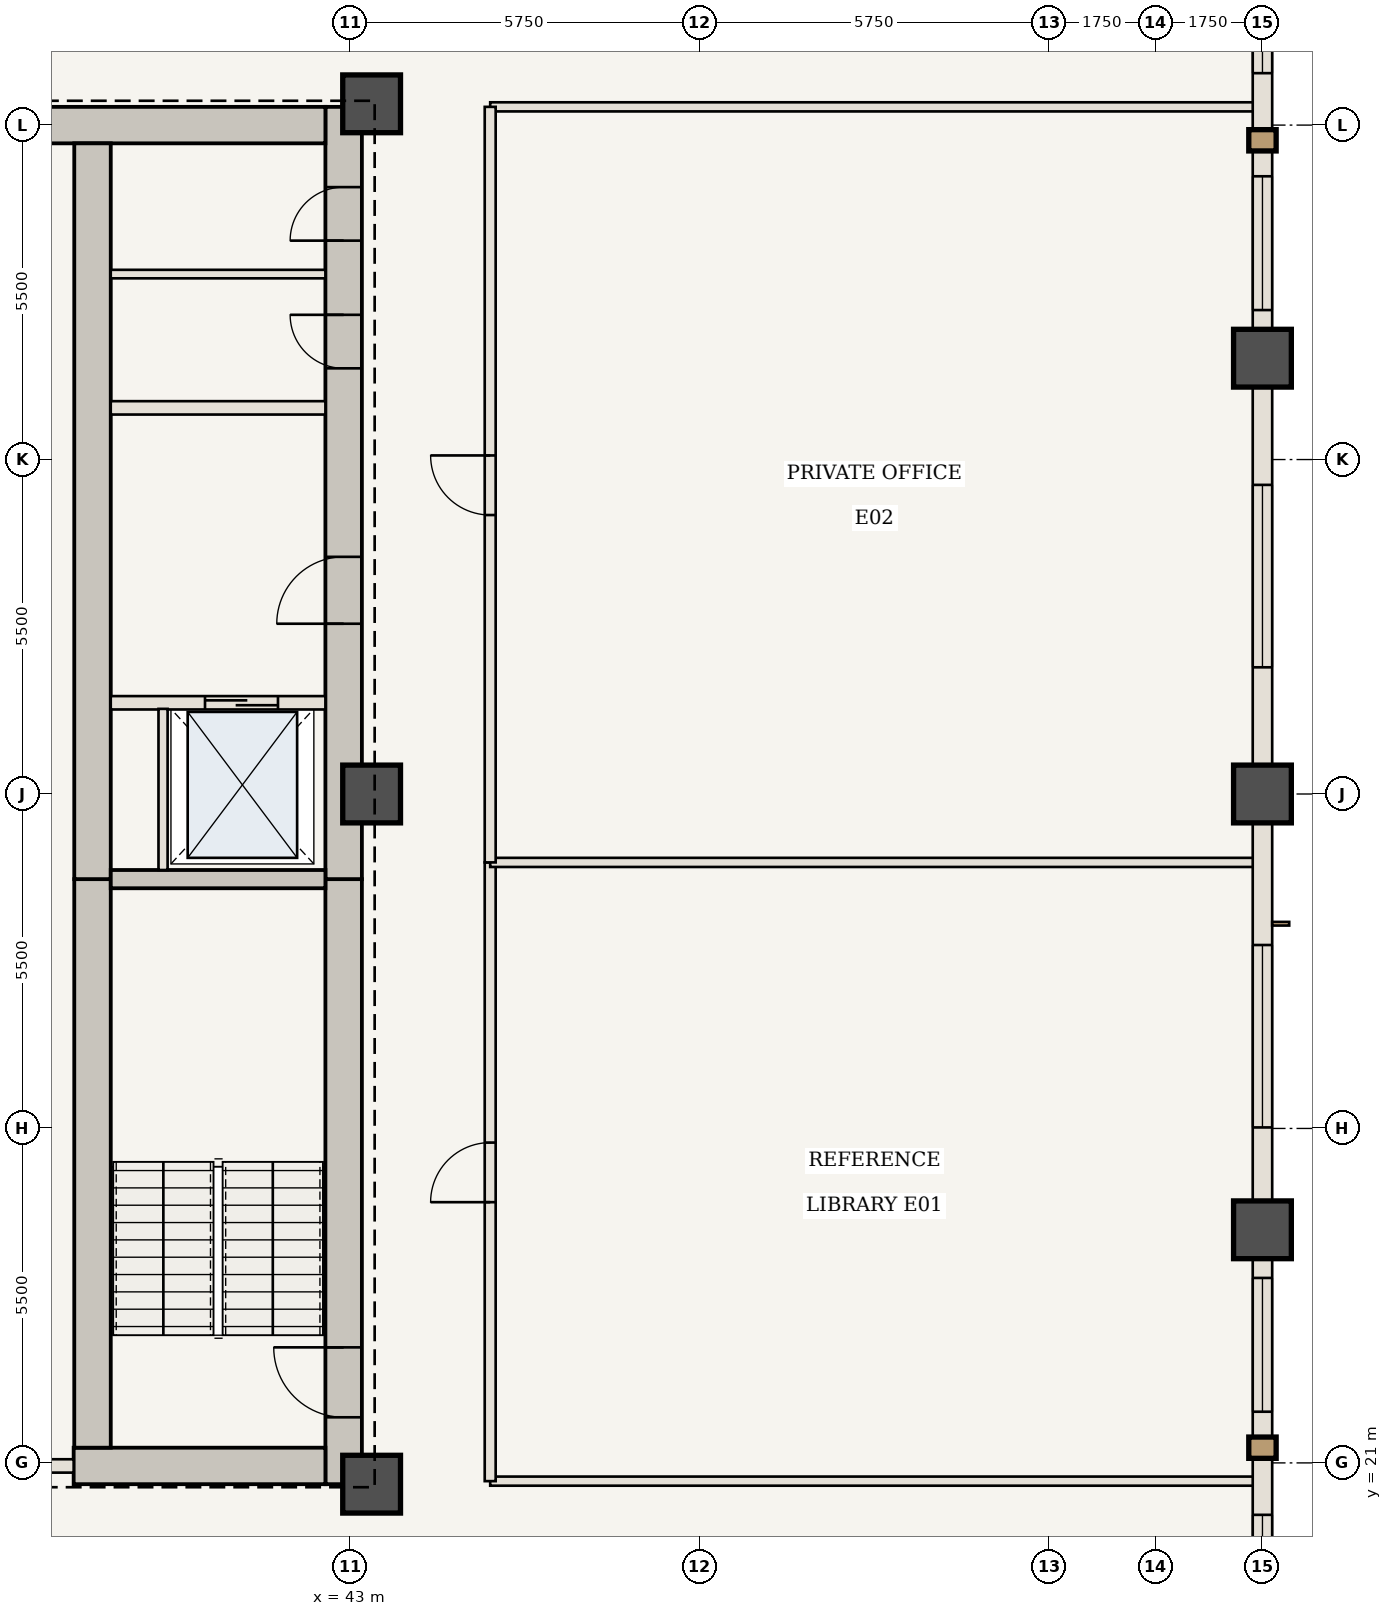
"""IFC4 building model, lengths in metres.
Left out: names, types, materials, properties, quantities, classifications, styles, units other than length and angle.
Written with IfcOpenShell. Run it as: python <this file> out.ifc"""

import sys

from ifc_helpers import new_model, si_unit, direction, frame, frame_2d, origin, origin_2d, place, context, subcontext, project, spatial, rectangle, extrude, element, fill, save


model = new_model("IFC4")
c1 = context("Model", 3, precision=1e-05, world=origin(), true_north=direction((0.0, 1.0)))
c2 = subcontext(c1, "Body", "Model", "MODEL_VIEW")
j1 = project(units=[si_unit("LENGTHUNIT", "METRE"), si_unit("PLANEANGLEUNIT", "RADIAN")], contexts=[c1])
p1 = place(None, origin())
s1 = spatial("IfcSite", under=j1, at=p1, CompositionType="ELEMENT")
p2 = place(p1, origin())
s2 = spatial("IfcBuilding", under=s1, at=p2, CompositionType="ELEMENT")
p3 = place(p2, frame((0.0, 0.0, 133.7)))
s3 = spatial("IfcBuildingStorey", under=s2, at=p3, CompositionType="ELEMENT", Elevation=133.7)
p4 = place(p3, frame((42.89, 20.65, 0.0), z_axis=(0.0, 0.0, 1.0), x_axis=(0.0, 1.0, 0.0)))
e1 = element("IfcWall", 1, at=p4, inside=s3, PredefinedType="SHEAR", context=c2, shape_type="SweptSolid", body=[
    extrude(rectangle(XDim=9.95, YDim=0.6, at=frame_2d((4.975, 0.0))), origin(), (0.0, 0.0, 1.0), 3.85),
])
p5 = place(p4, frame((1.1, 0.0, 0.0)))
e2 = element("IfcOpeningElement", 2, at=p5, cuts=e1, PredefinedType="OPENING", context=c2, shape_type="SweptSolid", body=[
    extrude(rectangle(XDim=1.15, YDim=2.15, at=frame_2d((0.575, 1.075))), frame((0.0, 0.31, 0.0), z_axis=(0.0, -1.0, 0.0), x_axis=(1.0, 0.0, 0.0)), (0.0, 0.0, 1.0), 0.62),
])
p6 = place(p3, frame((42.89, 30.6, 0.0), z_axis=(0.0, 0.0, 1.0), x_axis=(0.0, 1.0, 0.0)))
e3 = element("IfcWall", 3, at=p6, inside=s3, PredefinedType="SHEAR", context=c2, shape_type="SweptSolid", body=[
    extrude(rectangle(XDim=12.7, YDim=0.6, at=frame_2d((6.35, 0.0))), origin(), (0.0, 0.0, 1.0), 3.85),
])
p7 = place(p6, frame((4.2, 0.0, 0.0)))
e4 = element("IfcOpeningElement", 4, at=p7, cuts=e3, PredefinedType="OPENING", context=c2, shape_type="SweptSolid", body=[
    extrude(rectangle(XDim=1.1, YDim=2.15, at=frame_2d((0.55, 1.075))), frame((0.0, 0.31, 0.0), z_axis=(0.0, -1.0, 0.0), x_axis=(1.0, 0.0, 0.0)), (0.0, 0.0, 1.0), 0.62),
])
p8 = place(p6, frame((8.4, 0.0, 0.0)))
e5 = element("IfcOpeningElement", 5, at=p8, cuts=e3, PredefinedType="OPENING", context=c2, shape_type="SweptSolid", body=[
    extrude(rectangle(XDim=0.88, YDim=2.1, at=frame_2d((0.44, 1.05))), frame((0.0, 0.31, 0.0), z_axis=(0.0, -1.0, 0.0), x_axis=(1.0, 0.0, 0.0)), (0.0, 0.0, 1.0), 0.62),
])
p9 = place(p6, frame((10.5, 0.0, 0.0)))
e6 = element("IfcOpeningElement", 6, at=p9, cuts=e3, PredefinedType="OPENING", context=c2, shape_type="SweptSolid", body=[
    extrude(rectangle(XDim=0.88, YDim=2.1, at=frame_2d((0.44, 1.05))), frame((0.0, 0.31, 0.0), z_axis=(0.0, -1.0, 0.0), x_axis=(1.0, 0.0, 0.0)), (0.0, 0.0, 1.0), 0.62),
])
p10 = place(p3, frame((38.45, 20.95, 0.0), z_axis=(0.0, 0.0, 1.0), x_axis=(1.0, 0.0, 0.0)))
e7 = element("IfcWall", 7, at=p10, inside=s3, PredefinedType="SHEAR", context=c2, shape_type="SweptSolid", body=[
    extrude(rectangle(XDim=4.14, YDim=0.6, at=frame_2d((2.07, 0.0))), origin(), (0.0, 0.0, 1.0), 3.85),
])
p11 = place(p3, frame((37.75, 43.0, 0.0), z_axis=(0.0, 0.0, 1.0), x_axis=(1.0, 0.0, 0.0)))
e8 = element("IfcWall", 8, at=p11, inside=s3, PredefinedType="SHEAR", context=c2, shape_type="SweptSolid", body=[
    extrude(rectangle(XDim=4.84, YDim=0.6, at=frame_2d((2.42, 0.0))), origin(), (0.0, 0.0, 1.0), 3.85),
])
p12 = place(p3, frame((38.76, 21.25, 0.0), z_axis=(0.0, 0.0, 1.0), x_axis=(0.0, 1.0, 0.0)))
e9 = element("IfcWall", 9, at=p12, inside=s3, PredefinedType="SHEAR", context=c2, shape_type="SweptSolid", body=[
    extrude(rectangle(XDim=9.35, YDim=0.6, at=frame_2d((4.675, 0.0))), origin(), (0.0, 0.0, 1.0), 3.85),
])
p13 = place(p3, frame((38.76, 30.6, 0.0), z_axis=(0.0, 0.0, 1.0), x_axis=(0.0, 1.0, 0.0)))
e10 = element("IfcWall", 10, at=p13, inside=s3, PredefinedType="SHEAR", context=c2, shape_type="SweptSolid", body=[
    extrude(rectangle(XDim=12.1, YDim=0.6, at=frame_2d((6.05, 0.0))), origin(), (0.0, 0.0, 1.0), 3.85),
])
for number, where, z_axis, x_axis in (
    (11, (43.35, 20.65, 0.0), (0.0, 0.0, 1.0), (1.0, 0.0, 0.0)),
    (12, (43.35, 32.0, 0.0), (0.0, 0.0, 1.0), (1.0, 0.0, 0.0)),
    (13, (43.35, 43.35, 0.0), (0.0, 0.0, 1.0), (1.0, 0.0, 0.0)),
    (14, (58.0, 24.833, 0.0), (0.0, 0.0, 1.0), (1.0, 0.0, 0.0)),
    (15, (58.0, 32.0, 0.0), (0.0, 0.0, 1.0), (1.0, 0.0, 0.0)),
    (16, (58.0, 39.167, 0.0), (0.0, 0.0, 1.0), (1.0, 0.0, 0.0)),
):
    element("IfcColumn", number, at=place(p3, frame(where, z_axis=z_axis, x_axis=x_axis)), inside=s3, PredefinedType="COLUMN", context=c2, shape_type="SweptSolid", body=[
        extrude(rectangle(XDim=0.95, YDim=0.95, at=origin_2d()), origin(), (0.0, 0.0, 1.0), 3.85),
    ])
p14 = place(p3, frame((39.06, 30.6, 0.0), z_axis=(0.0, 0.0, 1.0), x_axis=(1.0, 0.0, 0.0)))
e17 = element("IfcWall", 17, at=p14, inside=s3, PredefinedType="SHEAR", context=c2, shape_type="SweptSolid", body=[
    extrude(rectangle(XDim=3.53, YDim=0.3, at=frame_2d((1.765, 0.0))), origin(), (0.0, 0.0, 1.0), 3.685),
])
p15 = place(p3, frame((39.06, 33.5, 0.0), z_axis=(0.0, 0.0, 1.0), x_axis=(1.0, 0.0, 0.0)))
e18 = element("IfcWall", 18, at=p15, inside=s3, PredefinedType="STANDARD", context=c2, shape_type="SweptSolid", body=[
    extrude(rectangle(XDim=3.53, YDim=0.22, at=frame_2d((1.765, 0.0))), origin(), (0.0, 0.0, 1.0), 3.685),
])
p16 = place(p15, frame((1.55, 0.0, 0.0)))
e19 = element("IfcOpeningElement", 19, at=p16, cuts=e18, PredefinedType="OPENING", context=c2, shape_type="SweptSolid", body=[
    extrude(rectangle(XDim=1.2, YDim=2.2, at=frame_2d((0.6, 1.1))), frame((0.0, 0.12, 0.0), z_axis=(0.0, -1.0, 0.0), x_axis=(1.0, 0.0, 0.0)), (0.0, 0.0, 1.0), 0.24),
])
p17 = place(p3, frame((39.92, 30.75, 0.0), z_axis=(0.0, 0.0, 1.0), x_axis=(0.0, 1.0, 0.0)))
e20 = element("IfcWall", 20, at=p17, inside=s3, PredefinedType="STANDARD", context=c2, shape_type="SweptSolid", body=[
    extrude(rectangle(XDim=2.65, YDim=0.15, at=frame_2d((1.325, 0.0))), origin(), (0.0, 0.0, 1.0), 3.685),
])
p18 = place(p3, frame((39.06, 38.35, 0.0), z_axis=(0.0, 0.0, 1.0), x_axis=(1.0, 0.0, 0.0)))
e21 = element("IfcWall", 21, at=p18, inside=s3, PredefinedType="STANDARD", context=c2, shape_type="SweptSolid", body=[
    extrude(rectangle(XDim=3.53, YDim=0.22, at=frame_2d((1.765, 0.0))), origin(), (0.0, 0.0, 1.0), 3.685),
])
p19 = place(p3, frame((39.06, 40.55, 0.0), z_axis=(0.0, 0.0, 1.0), x_axis=(1.0, 0.0, 0.0)))
e22 = element("IfcWall", 22, at=p19, inside=s3, PredefinedType="STANDARD", context=c2, shape_type="SweptSolid", body=[
    extrude(rectangle(XDim=3.53, YDim=0.14, at=frame_2d((1.765, 0.0))), origin(), (0.0, 0.0, 1.0), 3.685),
])
p20 = place(p3, frame((35.15, 20.95, 0.0), z_axis=(0.0, 0.0, 1.0), x_axis=(1.0, 0.0, 0.0)))
e23 = element("IfcWall", 23, at=p20, inside=s3, PredefinedType="STANDARD", context=c2, shape_type="SweptSolid", body=[
    extrude(rectangle(XDim=3.3, YDim=0.22, at=frame_2d((1.65, 0.0))), origin(), (0.0, 0.0, 1.0), 3.685),
])
p21 = place(p20, frame((1.1, 0.0, 0.0)))
e24 = element("IfcOpeningElement", 24, at=p21, cuts=e23, PredefinedType="OPENING", context=c2, shape_type="SweptSolid", body=[
    extrude(rectangle(XDim=1.1, YDim=2.15, at=frame_2d((0.55, 1.075))), frame((0.0, 0.12, 0.0), z_axis=(0.0, -1.0, 0.0), x_axis=(1.0, 0.0, 0.0)), (0.0, 0.0, 1.0), 0.24),
])
for number, where, z_axis, x_axis in (
    (25, (45.3, 20.7, 0.0), (0.0, 0.0, 1.0), (1.0, 0.0, 0.0)),
    (26, (45.3, 43.3, 0.0), (0.0, 0.0, 1.0), (1.0, 0.0, 0.0)),
):
    element("IfcWall", number, at=place(p3, frame(where, z_axis=z_axis, x_axis=x_axis)), inside=s3, PredefinedType="STANDARD", context=c2, shape_type="SweptSolid", body=[
        extrude(rectangle(XDim=12.64, YDim=0.15, at=frame_2d((6.32, 0.0))), origin(), (0.0, 0.0, 1.0), 3.065),
    ])
p22 = place(p3, frame((45.3, 20.7, 0.0), z_axis=(0.0, 0.0, 1.0), x_axis=(0.0, 1.0, 0.0)))
e27 = element("IfcWall", 27, at=p22, inside=s3, PredefinedType="STANDARD", context=c2, shape_type="SweptSolid", body=[
    extrude(rectangle(XDim=10.175, YDim=0.18, at=frame_2d((5.087, 0.0))), origin(), (0.0, 0.0, 1.0), 3.685),
])
p23 = place(p22, frame((4.587, 0.0, 0.0)))
e28 = element("IfcOpeningElement", 28, at=p23, cuts=e27, PredefinedType="OPENING", context=c2, shape_type="SweptSolid", body=[
    extrude(rectangle(XDim=0.98, YDim=2.2, at=frame_2d((0.49, 1.1))), frame((0.0, 0.1, 0.0), z_axis=(0.0, -1.0, 0.0), x_axis=(1.0, 0.0, 0.0)), (0.0, 0.0, 1.0), 0.2),
])
p24 = place(p3, frame((45.3, 30.875, 0.0), z_axis=(0.0, 0.0, 1.0), x_axis=(1.0, 0.0, 0.0)))
e29 = element("IfcWall", 29, at=p24, inside=s3, PredefinedType="STANDARD", context=c2, shape_type="SweptSolid", body=[
    extrude(rectangle(XDim=12.64, YDim=0.15, at=frame_2d((6.32, 0.0))), origin(), (0.0, 0.0, 1.0), 3.685),
])
p25 = place(p3, frame((45.3, 30.875, 0.0), z_axis=(0.0, 0.0, 1.0), x_axis=(0.0, 1.0, 0.0)))
e30 = element("IfcWall", 30, at=p25, inside=s3, PredefinedType="STANDARD", context=c2, shape_type="SweptSolid", body=[
    extrude(rectangle(XDim=12.425, YDim=0.18, at=frame_2d((6.212, 0.0))), origin(), (0.0, 0.0, 1.0), 3.685),
])
p26 = place(p25, frame((5.712, 0.0, 0.0)))
e31 = element("IfcOpeningElement", 31, at=p26, cuts=e30, PredefinedType="OPENING", context=c2, shape_type="SweptSolid", body=[
    extrude(rectangle(XDim=0.98, YDim=2.2, at=frame_2d((0.49, 1.1))), frame((0.0, 0.1, 0.0), z_axis=(0.0, -1.0, 0.0), x_axis=(1.0, 0.0, 0.0)), (0.0, 0.0, 1.0), 0.2),
])
p27 = place(p3, frame((58.0, 24.833, 0.0), z_axis=(0.0, 0.0, 1.0), x_axis=(0.0, -1.0, 0.0)))
e32 = element("IfcWall", 32, at=p27, inside=s3, PredefinedType="USERDEFINED", context=c2, shape_type="SweptSolid", body=[
    extrude(rectangle(XDim=7.167, YDim=0.32, at=frame_2d((3.583, 0.0))), origin(), (0.0, 0.0, 1.0), 2.885),
])
p28 = place(p27, frame((0.792, 0.0, 0.85)))
e33 = element("IfcOpeningElement", 33, at=p28, cuts=e32, PredefinedType="OPENING", context=c2, shape_type="SweptSolid", body=[
    extrude(rectangle(XDim=2.2, YDim=1.835, at=frame_2d((1.1, 0.917))), frame((0.0, 0.17, 0.0), z_axis=(0.0, -1.0, 0.0), x_axis=(1.0, 0.0, 0.0)), (0.0, 0.0, 1.0), 0.34),
])
p29 = place(p27, frame((4.688, 0.0, 0.85)))
e34 = element("IfcOpeningElement", 34, at=p29, cuts=e32, PredefinedType="OPENING", context=c2, shape_type="SweptSolid", body=[
    extrude(rectangle(XDim=1.6, YDim=1.835, at=frame_2d((0.8, 0.917))), frame((0.0, 0.17, 0.0), z_axis=(0.0, -1.0, 0.0), x_axis=(1.0, 0.0, 0.0)), (0.0, 0.0, 1.0), 0.34),
])
p30 = place(p3, frame((58.0, 32.0, 0.0), z_axis=(0.0, 0.0, 1.0), x_axis=(0.0, -1.0, 0.0)))
e35 = element("IfcWall", 35, at=p30, inside=s3, PredefinedType="USERDEFINED", context=c2, shape_type="SweptSolid", body=[
    extrude(rectangle(XDim=7.167, YDim=0.32, at=frame_2d((3.583, 0.0))), origin(), (0.0, 0.0, 1.0), 2.885),
])
p31 = place(p30, frame((2.483, 0.0, 0.85)))
e36 = element("IfcOpeningElement", 36, at=p31, cuts=e35, PredefinedType="OPENING", context=c2, shape_type="SweptSolid", body=[
    extrude(rectangle(XDim=3.0, YDim=1.835, at=frame_2d((1.5, 0.917))), frame((0.0, 0.17, 0.0), z_axis=(0.0, -1.0, 0.0), x_axis=(1.0, 0.0, 0.0)), (0.0, 0.0, 1.0), 0.34),
])
p32 = place(p3, frame((58.0, 39.167, 0.0), z_axis=(0.0, 0.0, 1.0), x_axis=(0.0, -1.0, 0.0)))
e37 = element("IfcWall", 37, at=p32, inside=s3, PredefinedType="USERDEFINED", context=c2, shape_type="SweptSolid", body=[
    extrude(rectangle(XDim=7.167, YDim=0.32, at=frame_2d((3.583, 0.0))), origin(), (0.0, 0.0, 1.0), 2.885),
])
p33 = place(p32, frame((2.083, 0.0, 0.85)))
e38 = element("IfcOpeningElement", 38, at=p33, cuts=e37, PredefinedType="OPENING", context=c2, shape_type="SweptSolid", body=[
    extrude(rectangle(XDim=3.0, YDim=1.835, at=frame_2d((1.5, 0.917))), frame((0.0, 0.17, 0.0), z_axis=(0.0, -1.0, 0.0), x_axis=(1.0, 0.0, 0.0)), (0.0, 0.0, 1.0), 0.34),
])
p34 = place(p3, frame((58.0, 46.333, 0.0), z_axis=(0.0, 0.0, 1.0), x_axis=(0.0, -1.0, 0.0)))
e39 = element("IfcWall", 39, at=p34, inside=s3, PredefinedType="USERDEFINED", context=c2, shape_type="SweptSolid", body=[
    extrude(rectangle(XDim=7.167, YDim=0.32, at=frame_2d((3.583, 0.0))), origin(), (0.0, 0.0, 1.0), 2.885),
])
p35 = place(p34, frame((0.879, 0.0, 0.85)))
e40 = element("IfcOpeningElement", 40, at=p35, cuts=e39, PredefinedType="OPENING", context=c2, shape_type="SweptSolid", body=[
    extrude(rectangle(XDim=1.6, YDim=1.835, at=frame_2d((0.8, 0.917))), frame((0.0, 0.17, 0.0), z_axis=(0.0, -1.0, 0.0), x_axis=(1.0, 0.0, 0.0)), (0.0, 0.0, 1.0), 0.34),
])
p36 = place(p34, frame((4.175, 0.0, 0.85)))
e41 = element("IfcOpeningElement", 41, at=p36, cuts=e39, PredefinedType="OPENING", context=c2, shape_type="SweptSolid", body=[
    extrude(rectangle(XDim=2.2, YDim=1.835, at=frame_2d((1.1, 0.917))), frame((0.0, 0.17, 0.0), z_axis=(0.0, -1.0, 0.0), x_axis=(1.0, 0.0, 0.0)), (0.0, 0.0, 1.0), 0.34),
])
p37 = place(p5, origin())
e42 = element("IfcDoor", 42, at=p37, inside=s3, OperationType="SINGLE_SWING_RIGHT", PredefinedType="DOOR", context=c2, shape_type="SweptSolid", body=[
    extrude(rectangle(XDim=1.15, YDim=2.15, at=frame_2d((0.575, 1.075))), frame((0.0, 0.025, 0.0), z_axis=(0.0, -1.0, 0.0), x_axis=(1.0, 0.0, 0.0)), (0.0, 0.0, 1.0), 0.05),
])
fill(e2, e42)
p38 = place(p7, origin())
e43 = element("IfcDoor", 43, at=p38, inside=s3, OperationType="SINGLE_SWING_LEFT", PredefinedType="DOOR", context=c2, shape_type="SweptSolid", body=[
    extrude(rectangle(XDim=1.1, YDim=2.15, at=frame_2d((0.55, 1.075))), frame((0.0, 0.025, 0.0), z_axis=(0.0, -1.0, 0.0), x_axis=(1.0, 0.0, 0.0)), (0.0, 0.0, 1.0), 0.05),
])
fill(e4, e43)
p39 = place(p8, origin())
e44 = element("IfcDoor", 44, at=p39, inside=s3, OperationType="SINGLE_SWING_RIGHT", PredefinedType="DOOR", context=c2, shape_type="SweptSolid", body=[
    extrude(rectangle(XDim=0.88, YDim=2.1, at=frame_2d((0.44, 1.05))), frame((0.0, 0.025, 0.0), z_axis=(0.0, -1.0, 0.0), x_axis=(1.0, 0.0, 0.0)), (0.0, 0.0, 1.0), 0.05),
])
fill(e5, e44)
p40 = place(p9, origin())
e45 = element("IfcDoor", 45, at=p40, inside=s3, OperationType="SINGLE_SWING_LEFT", PredefinedType="DOOR", context=c2, shape_type="SweptSolid", body=[
    extrude(rectangle(XDim=0.88, YDim=2.1, at=frame_2d((0.44, 1.05))), frame((0.0, 0.025, 0.0), z_axis=(0.0, -1.0, 0.0), x_axis=(1.0, 0.0, 0.0)), (0.0, 0.0, 1.0), 0.05),
])
fill(e6, e45)
p41 = place(p16, origin())
e46 = element("IfcDoor", 46, at=p41, inside=s3, OperationType="DOUBLE_DOOR_SLIDING", PredefinedType="DOOR", context=c2, shape_type="SweptSolid", body=[
    extrude(rectangle(XDim=1.2, YDim=2.2, at=frame_2d((0.6, 1.1))), frame((0.0, 0.025, 0.0), z_axis=(0.0, -1.0, 0.0), x_axis=(1.0, 0.0, 0.0)), (0.0, 0.0, 1.0), 0.05),
])
fill(e19, e46)
p42 = place(p23, origin())
e47 = element("IfcDoor", 47, at=p42, inside=s3, OperationType="SINGLE_SWING_LEFT", PredefinedType="DOOR", context=c2, shape_type="SweptSolid", body=[
    extrude(rectangle(XDim=0.98, YDim=2.2, at=frame_2d((0.49, 1.1))), frame((0.0, 0.025, 0.0), z_axis=(0.0, -1.0, 0.0), x_axis=(1.0, 0.0, 0.0)), (0.0, 0.0, 1.0), 0.05),
])
fill(e28, e47)
p43 = place(p26, origin())
e48 = element("IfcDoor", 48, at=p43, inside=s3, OperationType="SINGLE_SWING_RIGHT", PredefinedType="DOOR", context=c2, shape_type="SweptSolid", body=[
    extrude(rectangle(XDim=0.98, YDim=2.2, at=frame_2d((0.49, 1.1))), frame((0.0, 0.025, 0.0), z_axis=(0.0, -1.0, 0.0), x_axis=(1.0, 0.0, 0.0)), (0.0, 0.0, 1.0), 0.05),
])
fill(e31, e48)
p44 = place(p28, origin())
e49 = element("IfcWindow", 49, at=p44, inside=s3, PartitioningType="SINGLE_PANEL", PredefinedType="WINDOW", context=c2, shape_type="SweptSolid", body=[
    extrude(rectangle(XDim=2.2, YDim=1.835, at=frame_2d((1.1, 0.917))), frame((0.0, 0.03, 0.0), z_axis=(0.0, -1.0, 0.0), x_axis=(1.0, 0.0, 0.0)), (0.0, 0.0, 1.0), 0.06),
])
fill(e33, e49)
p45 = place(p29, origin())
e50 = element("IfcWindow", 50, at=p45, inside=s3, PartitioningType="SINGLE_PANEL", PredefinedType="WINDOW", context=c2, shape_type="SweptSolid", body=[
    extrude(rectangle(XDim=1.6, YDim=1.835, at=frame_2d((0.8, 0.917))), frame((0.0, 0.03, 0.0), z_axis=(0.0, -1.0, 0.0), x_axis=(1.0, 0.0, 0.0)), (0.0, 0.0, 1.0), 0.06),
])
fill(e34, e50)
p46 = place(p31, origin())
e51 = element("IfcWindow", 51, at=p46, inside=s3, PartitioningType="SINGLE_PANEL", PredefinedType="WINDOW", context=c2, shape_type="SweptSolid", body=[
    extrude(rectangle(XDim=3.0, YDim=1.835, at=frame_2d((1.5, 0.917))), frame((0.0, 0.03, 0.0), z_axis=(0.0, -1.0, 0.0), x_axis=(1.0, 0.0, 0.0)), (0.0, 0.0, 1.0), 0.06),
])
fill(e36, e51)
p47 = place(p33, origin())
e52 = element("IfcWindow", 52, at=p47, inside=s3, PartitioningType="SINGLE_PANEL", PredefinedType="WINDOW", context=c2, shape_type="SweptSolid", body=[
    extrude(rectangle(XDim=3.0, YDim=1.835, at=frame_2d((1.5, 0.917))), frame((0.0, 0.03, 0.0), z_axis=(0.0, -1.0, 0.0), x_axis=(1.0, 0.0, 0.0)), (0.0, 0.0, 1.0), 0.06),
])
fill(e38, e52)
p48 = place(p35, origin())
e53 = element("IfcWindow", 53, at=p48, inside=s3, PartitioningType="SINGLE_PANEL", PredefinedType="WINDOW", context=c2, shape_type="SweptSolid", body=[
    extrude(rectangle(XDim=1.6, YDim=1.835, at=frame_2d((0.8, 0.917))), frame((0.0, 0.03, 0.0), z_axis=(0.0, -1.0, 0.0), x_axis=(1.0, 0.0, 0.0)), (0.0, 0.0, 1.0), 0.06),
])
fill(e40, e53)
p49 = place(p36, origin())
e54 = element("IfcWindow", 54, at=p49, inside=s3, PartitioningType="SINGLE_PANEL", PredefinedType="WINDOW", context=c2, shape_type="SweptSolid", body=[
    extrude(rectangle(XDim=2.2, YDim=1.835, at=frame_2d((1.1, 0.917))), frame((0.0, 0.03, 0.0), z_axis=(0.0, -1.0, 0.0), x_axis=(1.0, 0.0, 0.0)), (0.0, 0.0, 1.0), 0.06),
])
fill(e41, e54)
save(model, sys.argv[1])
